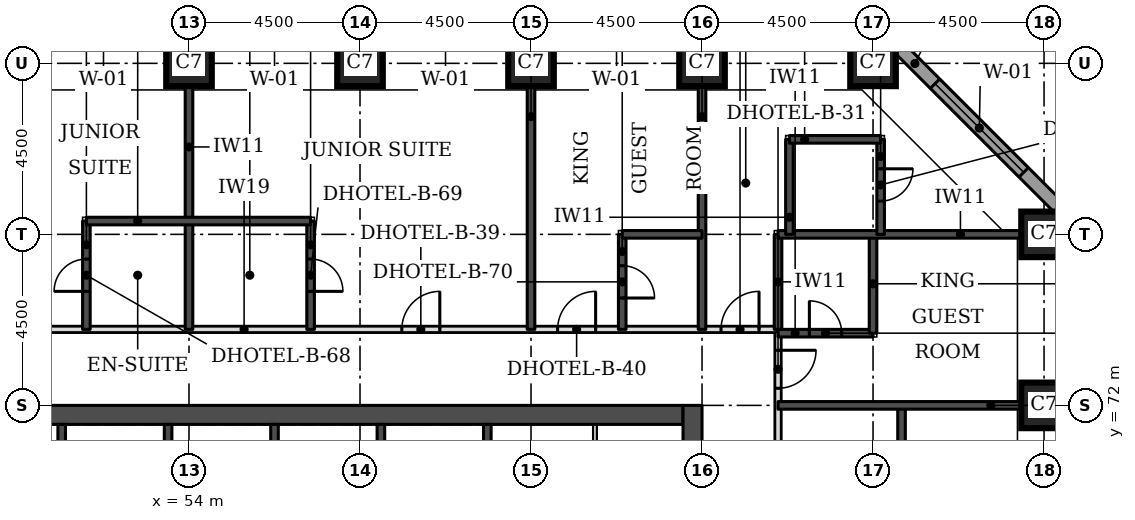
"""IFC4 building model, lengths in metres.
Left out: names, types, materials, properties, quantities, classifications, styles, units other than length and angle.
Written with IfcOpenShell. Run it as: python <this file> out.ifc"""

import sys

from ifc_helpers import new_model, si_unit, direction, frame, frame_2d, origin, origin_2d, place, context, subcontext, project, spatial, rectangle, extrude, element, fill, save


model = new_model("IFC4")
c1 = context("Model", 3, precision=1e-05, world=origin(), true_north=direction((0.0, 1.0)))
c2 = subcontext(c1, "Body", "Model", "MODEL_VIEW")
j1 = project(units=[si_unit("LENGTHUNIT", "METRE"), si_unit("PLANEANGLEUNIT", "RADIAN")], contexts=[c1])
p1 = place(None, origin())
s1 = spatial("IfcSite", under=j1, at=p1, CompositionType="ELEMENT")
p2 = place(p1, origin())
s2 = spatial("IfcBuilding", under=s1, at=p2, CompositionType="ELEMENT")
p3 = place(p2, frame((0.0, 0.0, 29.7)))
s3 = spatial("IfcBuildingStorey", under=s2, at=p3, CompositionType="ELEMENT", Elevation=29.7)
for number, where, z_axis, x_axis in (
    (1, (76.5, 72.0, 0.0), (0.0, 0.0, 1.0), (1.0, 0.0, 0.0)),
    (2, (76.5, 76.5, 0.0), (0.0, 0.0, 1.0), (1.0, 0.0, 0.0)),
    (3, (54.0, 81.0, 0.0), (0.0, 0.0, 1.0), (1.0, 0.0, 0.0)),
    (4, (58.5, 81.0, 0.0), (0.0, 0.0, 1.0), (1.0, 0.0, 0.0)),
    (5, (63.0, 81.0, 0.0), (0.0, 0.0, 1.0), (1.0, 0.0, 0.0)),
    (6, (67.5, 81.0, 0.0), (0.0, 0.0, 1.0), (1.0, 0.0, 0.0)),
    (7, (72.0, 81.0, 0.0), (0.0, 0.0, 1.0), (1.0, 0.0, 0.0)),
):
    element("IfcColumn", number, at=place(p3, frame(where, z_axis=z_axis, x_axis=x_axis)), inside=s3, PredefinedType="COLUMN", context=c2, shape_type="SweptSolid", body=[
        extrude(rectangle(XDim=1.2, YDim=1.2, at=origin_2d()), origin(), (0.0, 0.0, 1.0), 3.3),
    ])
p4 = place(p3, frame((45.5, 71.75, 0.0), z_axis=(0.0, 0.0, 1.0), x_axis=(1.0, 0.0, 0.0)))
e8 = element("IfcWall", 8, at=p4, inside=s3, PredefinedType="SHEAR", context=c2, shape_type="SweptSolid", body=[
    extrude(rectangle(XDim=21.5, YDim=0.5, at=frame_2d((10.75, 0.0))), origin(), (0.0, 0.0, 1.0), 3.3),
])
p5 = place(p3, frame((67.25, 49.5, 0.0), z_axis=(0.0, 0.0, 1.0), x_axis=(0.0, 1.0, 0.0)))
e9 = element("IfcWall", 9, at=p5, inside=s3, PredefinedType="SHEAR", context=c2, shape_type="SweptSolid", body=[
    extrude(rectangle(XDim=22.5, YDim=0.5, at=frame_2d((11.25, 0.0))), origin(), (0.0, 0.0, 1.0), 3.3),
])
p6 = place(p5, frame((4.2, 0.0, 0.0)))
e10 = element("IfcOpeningElement", 10, at=p6, cuts=e9, PredefinedType="OPENING", context=c2, shape_type="SweptSolid", body=[
    extrude(rectangle(XDim=1.8, YDim=2.1, at=frame_2d((0.9, 1.05))), frame((0.0, 0.26, 0.0), z_axis=(0.0, -1.0, 0.0), x_axis=(1.0, 0.0, 0.0)), (0.0, 0.0, 1.0), 0.52),
])
p7 = place(p5, frame((6.9, 0.0, 0.0)))
e11 = element("IfcOpeningElement", 11, at=p7, cuts=e9, PredefinedType="OPENING", context=c2, shape_type="SweptSolid", body=[
    extrude(rectangle(XDim=1.1, YDim=2.1, at=frame_2d((0.55, 1.05))), frame((0.0, 0.26, 0.0), z_axis=(0.0, -1.0, 0.0), x_axis=(1.0, 0.0, 0.0)), (0.0, 0.0, 1.0), 0.52),
])
p8 = place(p5, frame((13.6, 0.0, 0.0)))
e12 = element("IfcOpeningElement", 12, at=p8, cuts=e9, PredefinedType="OPENING", context=c2, shape_type="SweptSolid", body=[
    extrude(rectangle(XDim=1.1, YDim=2.1, at=frame_2d((0.55, 1.05))), frame((0.0, 0.26, 0.0), z_axis=(0.0, -1.0, 0.0), x_axis=(1.0, 0.0, 0.0)), (0.0, 0.0, 1.0), 0.52),
])
p9 = place(p5, frame((16.5, 0.0, 0.0)))
e13 = element("IfcOpeningElement", 13, at=p9, cuts=e9, PredefinedType="OPENING", context=c2, shape_type="SweptSolid", body=[
    extrude(rectangle(XDim=1.8, YDim=2.1, at=frame_2d((0.9, 1.05))), frame((0.0, 0.26, 0.0), z_axis=(0.0, -1.0, 0.0), x_axis=(1.0, 0.0, 0.0)), (0.0, 0.0, 1.0), 0.52),
])
p10 = place(p3, frame((77.326, 76.77, 0.0), z_axis=(0.0, 0.0, 1.0), x_axis=(-0.707106781187, 0.707106781187, 0.0)))
e14 = element("IfcWall", 14, at=p10, inside=s3, PredefinedType="STANDARD", context=c2, shape_type="SweptSolid", body=[
    extrude(rectangle(XDim=7.151, YDim=0.35, at=frame_2d((3.576, 0.0))), origin(), (0.0, 0.0, 1.0), 3.055),
])
p11 = place(p10, frame((1.926, 0.0, 0.8)))
e15 = element("IfcOpeningElement", 15, at=p11, cuts=e14, PredefinedType="OPENING", context=c2, shape_type="SweptSolid", body=[
    extrude(rectangle(XDim=3.3, YDim=1.5, at=frame_2d((1.65, 0.75))), frame((0.0, 0.185, 0.0), z_axis=(0.0, -1.0, 0.0), x_axis=(1.0, 0.0, 0.0)), (0.0, 0.0, 1.0), 0.37),
])
p12 = place(p3, frame((69.5, 47.5, 0.0), z_axis=(0.0, 0.0, 1.0), x_axis=(0.0, 1.0, 0.0)))
e16 = element("IfcWall", 16, at=p12, inside=s3, PredefinedType="PARTITIONING", context=c2, shape_type="SweptSolid", body=[
    extrude(rectangle(XDim=26.5, YDim=0.15, at=frame_2d((13.25, 0.0))), origin(), (0.0, 0.0, 1.0), 3.08),
])
p13 = place(p12, frame((24.95, 0.0, 0.0)))
e17 = element("IfcOpeningElement", 17, at=p13, cuts=e16, PredefinedType="OPENING", context=c2, shape_type="SweptSolid", body=[
    extrude(rectangle(XDim=1.0, YDim=2.1, at=frame_2d((0.5, 1.05))), frame((0.0, 0.085, 0.0), z_axis=(0.0, -1.0, 0.0), x_axis=(1.0, 0.0, 0.0)), (0.0, 0.0, 1.0), 0.17),
])
p14 = place(p12, frame((20.7, 0.0, 0.0)))
e18 = element("IfcOpeningElement", 18, at=p14, cuts=e16, PredefinedType="OPENING", context=c2, shape_type="SweptSolid", body=[
    extrude(rectangle(XDim=1.0, YDim=2.1, at=frame_2d((0.5, 1.05))), frame((0.0, 0.085, 0.0), z_axis=(0.0, -1.0, 0.0), x_axis=(1.0, 0.0, 0.0)), (0.0, 0.0, 1.0), 0.17),
])
p15 = place(p12, frame((18.55, 0.0, 0.0)))
e19 = element("IfcOpeningElement", 19, at=p15, cuts=e16, PredefinedType="OPENING", context=c2, shape_type="SweptSolid", body=[
    extrude(rectangle(XDim=1.0, YDim=2.1, at=frame_2d((0.5, 1.05))), frame((0.0, 0.085, 0.0), z_axis=(0.0, -1.0, 0.0), x_axis=(1.0, 0.0, 0.0)), (0.0, 0.0, 1.0), 0.17),
])
p16 = place(p12, frame((11.7, 0.0, 0.0)))
e20 = element("IfcOpeningElement", 20, at=p16, cuts=e16, PredefinedType="OPENING", context=c2, shape_type="SweptSolid", body=[
    extrude(rectangle(XDim=1.0, YDim=2.1, at=frame_2d((0.5, 1.05))), frame((0.0, 0.085, 0.0), z_axis=(0.0, -1.0, 0.0), x_axis=(1.0, 0.0, 0.0)), (0.0, 0.0, 1.0), 0.17),
])
p17 = place(p12, frame((7.65, 0.0, 0.0)))
e21 = element("IfcOpeningElement", 21, at=p17, cuts=e16, PredefinedType="OPENING", context=c2, shape_type="SweptSolid", body=[
    extrude(rectangle(XDim=1.1, YDim=2.1, at=frame_2d((0.55, 1.05))), frame((0.0, 0.085, 0.0), z_axis=(0.0, -1.0, 0.0), x_axis=(1.0, 0.0, 0.0)), (0.0, 0.0, 1.0), 0.17),
])
p18 = place(p12, frame((0.447, 0.0, 0.0)))
e22 = element("IfcOpeningElement", 22, at=p18, cuts=e16, PredefinedType="OPENING", context=c2, shape_type="SweptSolid", body=[
    extrude(rectangle(XDim=1.0, YDim=2.1, at=frame_2d((0.5, 1.05))), frame((0.0, 0.085, 0.0), z_axis=(0.0, -1.0, 0.0), x_axis=(1.0, 0.0, 0.0)), (0.0, 0.0, 1.0), 0.17),
])
p19 = place(p3, frame((43.0, 74.0, 0.0), z_axis=(0.0, 0.0, 1.0), x_axis=(1.0, 0.0, 0.0)))
e23 = element("IfcWall", 23, at=p19, inside=s3, PredefinedType="PARTITIONING", context=c2, shape_type="SweptSolid", body=[
    extrude(rectangle(XDim=26.5, YDim=0.15, at=frame_2d((13.25, 0.0))), origin(), (0.0, 0.0, 1.0), 3.08),
])
p20 = place(p19, frame((4.65, 0.0, 0.0)))
e24 = element("IfcOpeningElement", 24, at=p20, cuts=e23, PredefinedType="OPENING", context=c2, shape_type="SweptSolid", body=[
    extrude(rectangle(XDim=1.0, YDim=2.1, at=frame_2d((0.5, 1.05))), frame((0.0, 0.085, 0.0), z_axis=(0.0, -1.0, 0.0), x_axis=(1.0, 0.0, 0.0)), (0.0, 0.0, 1.0), 0.17),
])
p21 = place(p19, frame((16.6, 0.0, 0.0)))
e25 = element("IfcOpeningElement", 25, at=p21, cuts=e23, PredefinedType="OPENING", context=c2, shape_type="SweptSolid", body=[
    extrude(rectangle(XDim=1.0, YDim=2.1, at=frame_2d((0.5, 1.05))), frame((0.0, 0.085, 0.0), z_axis=(0.0, -1.0, 0.0), x_axis=(1.0, 0.0, 0.0)), (0.0, 0.0, 1.0), 0.17),
])
p22 = place(p19, frame((20.7, 0.0, 0.0)))
e26 = element("IfcOpeningElement", 26, at=p22, cuts=e23, PredefinedType="OPENING", context=c2, shape_type="SweptSolid", body=[
    extrude(rectangle(XDim=1.0, YDim=2.1, at=frame_2d((0.5, 1.05))), frame((0.0, 0.085, 0.0), z_axis=(0.0, -1.0, 0.0), x_axis=(1.0, 0.0, 0.0)), (0.0, 0.0, 1.0), 0.17),
])
p23 = place(p19, frame((0.5, 0.0, 0.0)))
e27 = element("IfcOpeningElement", 27, at=p23, cuts=e23, PredefinedType="OPENING", context=c2, shape_type="SweptSolid", body=[
    extrude(rectangle(XDim=1.0, YDim=2.1, at=frame_2d((0.5, 1.05))), frame((0.0, 0.085, 0.0), z_axis=(0.0, -1.0, 0.0), x_axis=(1.0, 0.0, 0.0)), (0.0, 0.0, 1.0), 0.17),
])
p24 = place(p19, frame((25.0, 0.0, 0.0)))
e28 = element("IfcOpeningElement", 28, at=p24, cuts=e23, PredefinedType="OPENING", context=c2, shape_type="SweptSolid", body=[
    extrude(rectangle(XDim=1.0, YDim=2.1, at=frame_2d((0.5, 1.05))), frame((0.0, 0.085, 0.0), z_axis=(0.0, -1.0, 0.0), x_axis=(1.0, 0.0, 0.0)), (0.0, 0.0, 1.0), 0.17),
])
p25 = place(p3, frame((72.75, 69.9, 0.0), z_axis=(0.0, 0.0, 1.0), x_axis=(0.0, 1.0, 0.0)))
e29 = element("IfcWall", 29, at=p25, inside=s3, PredefinedType="SOLIDWALL", context=c2, shape_type="SweptSolid", body=[
    extrude(rectangle(XDim=2.1, YDim=0.2, at=frame_2d((1.05, 0.0))), origin(), (0.0, 0.0, 1.0), 3.08),
])
p26 = place(p3, frame((69.5, 72.0, 0.0), z_axis=(0.0, 0.0, 1.0), x_axis=(1.0, 0.0, 0.0)))
e30 = element("IfcWall", 30, at=p26, inside=s3, PredefinedType="SOLIDWALL", context=c2, shape_type="SweptSolid", body=[
    extrude(rectangle(XDim=6.4, YDim=0.2, at=frame_2d((3.2, 0.0))), origin(), (0.0, 0.0, 1.0), 3.08),
])
p27 = place(p3, frame((69.5, 73.9, 0.0), z_axis=(0.0, 0.0, 1.0), x_axis=(1.0, 0.0, 0.0)))
e31 = element("IfcWall", 31, at=p27, inside=s3, PredefinedType="SOLIDWALL", context=c2, shape_type="SweptSolid", body=[
    extrude(rectangle(XDim=2.5, YDim=0.2, at=frame_2d((1.25, 0.0))), origin(), (0.0, 0.0, 1.0), 3.08),
])
p28 = place(p27, frame((0.825, 0.0, 0.0)))
e32 = element("IfcOpeningElement", 32, at=p28, cuts=e31, PredefinedType="OPENING", context=c2, shape_type="SweptSolid", body=[
    extrude(rectangle(XDim=0.85, YDim=2.1, at=frame_2d((0.425, 1.05))), frame((0.0, 0.11, 0.0), z_axis=(0.0, -1.0, 0.0), x_axis=(1.0, 0.0, 0.0)), (0.0, 0.0, 1.0), 0.22),
])
p29 = place(p3, frame((72.0, 73.9, 0.0), z_axis=(0.0, 0.0, 1.0), x_axis=(0.0, 1.0, 0.0)))
e33 = element("IfcWall", 33, at=p29, inside=s3, PredefinedType="SOLIDWALL", context=c2, shape_type="SweptSolid", body=[
    extrude(rectangle(XDim=2.6, YDim=0.2, at=frame_2d((1.3, 0.0))), origin(), (0.0, 0.0, 1.0), 3.08),
])
p30 = place(p3, frame((51.3, 74.0, 0.0), z_axis=(0.0, 0.0, 1.0), x_axis=(0.0, 1.0, 0.0)))
e34 = element("IfcWall", 34, at=p30, inside=s3, PredefinedType="SOLIDWALL", context=c2, shape_type="SweptSolid", body=[
    extrude(rectangle(XDim=2.85, YDim=0.2, at=frame_2d((1.425, 0.0))), origin(), (0.0, 0.0, 1.0), 3.08),
])
p31 = place(p30, frame((1.0, 0.0, 0.0)))
e35 = element("IfcOpeningElement", 35, at=p31, cuts=e34, PredefinedType="OPENING", context=c2, shape_type="SweptSolid", body=[
    extrude(rectangle(XDim=0.85, YDim=2.1, at=frame_2d((0.425, 1.05))), frame((0.0, 0.11, 0.0), z_axis=(0.0, -1.0, 0.0), x_axis=(1.0, 0.0, 0.0)), (0.0, 0.0, 1.0), 0.22),
])
p32 = place(p3, frame((54.0, 74.0, 0.0), z_axis=(0.0, 0.0, 1.0), x_axis=(0.0, 1.0, 0.0)))
e36 = element("IfcWall", 36, at=p32, inside=s3, PredefinedType="SOLIDWALL", context=c2, shape_type="SweptSolid", body=[
    extrude(rectangle(XDim=6.4, YDim=0.2, at=frame_2d((3.2, 0.0))), origin(), (0.0, 0.0, 1.0), 3.08),
])
p33 = place(p3, frame((57.2, 74.0, 0.0), z_axis=(0.0, 0.0, 1.0), x_axis=(0.0, 1.0, 0.0)))
e37 = element("IfcWall", 37, at=p33, inside=s3, PredefinedType="SOLIDWALL", context=c2, shape_type="SweptSolid", body=[
    extrude(rectangle(XDim=2.85, YDim=0.2, at=frame_2d((1.425, 0.0))), origin(), (0.0, 0.0, 1.0), 3.08),
])
p34 = place(p33, frame((1.0, 0.0, 0.0)))
e38 = element("IfcOpeningElement", 38, at=p34, cuts=e37, PredefinedType="OPENING", context=c2, shape_type="SweptSolid", body=[
    extrude(rectangle(XDim=0.85, YDim=2.1, at=frame_2d((0.425, 1.05))), frame((0.0, 0.11, 0.0), z_axis=(0.0, -1.0, 0.0), x_axis=(1.0, 0.0, 0.0)), (0.0, 0.0, 1.0), 0.22),
])
p35 = place(p3, frame((63.0, 74.0, 0.0), z_axis=(0.0, 0.0, 1.0), x_axis=(0.0, 1.0, 0.0)))
e39 = element("IfcWall", 39, at=p35, inside=s3, PredefinedType="SOLIDWALL", context=c2, shape_type="SweptSolid", body=[
    extrude(rectangle(XDim=6.4, YDim=0.2, at=frame_2d((3.2, 0.0))), origin(), (0.0, 0.0, 1.0), 3.08),
])
p36 = place(p3, frame((65.4, 74.0, 0.0), z_axis=(0.0, 0.0, 1.0), x_axis=(0.0, 1.0, 0.0)))
e40 = element("IfcWall", 40, at=p36, inside=s3, PredefinedType="SOLIDWALL", context=c2, shape_type="SweptSolid", body=[
    extrude(rectangle(XDim=2.5, YDim=0.2, at=frame_2d((1.25, 0.0))), origin(), (0.0, 0.0, 1.0), 3.08),
])
p37 = place(p36, frame((0.825, 0.0, 0.0)))
e41 = element("IfcOpeningElement", 41, at=p37, cuts=e40, PredefinedType="OPENING", context=c2, shape_type="SweptSolid", body=[
    extrude(rectangle(XDim=0.85, YDim=2.1, at=frame_2d((0.425, 1.05))), frame((0.0, 0.11, 0.0), z_axis=(0.0, -1.0, 0.0), x_axis=(1.0, 0.0, 0.0)), (0.0, 0.0, 1.0), 0.22),
])
p38 = place(p3, frame((67.5, 74.0, 0.0), z_axis=(0.0, 0.0, 1.0), x_axis=(0.0, 1.0, 0.0)))
e42 = element("IfcWall", 42, at=p38, inside=s3, PredefinedType="SOLIDWALL", context=c2, shape_type="SweptSolid", body=[
    extrude(rectangle(XDim=6.4, YDim=0.2, at=frame_2d((3.2, 0.0))), origin(), (0.0, 0.0, 1.0), 3.08),
])
p39 = place(p3, frame((69.5, 74.0, 0.0), z_axis=(0.0, 0.0, 1.0), x_axis=(0.0, 1.0, 0.0)))
e43 = element("IfcWall", 43, at=p39, inside=s3, PredefinedType="SOLIDWALL", context=c2, shape_type="SweptSolid", body=[
    extrude(rectangle(XDim=2.5, YDim=0.2, at=frame_2d((1.25, 0.0))), origin(), (0.0, 0.0, 1.0), 3.08),
])
p40 = place(p3, frame((65.4, 76.5, 0.0), z_axis=(0.0, 0.0, 1.0), x_axis=(1.0, 0.0, 0.0)))
e44 = element("IfcWall", 44, at=p40, inside=s3, PredefinedType="SOLIDWALL", context=c2, shape_type="SweptSolid", body=[
    extrude(rectangle(XDim=2.1, YDim=0.2, at=frame_2d((1.05, 0.0))), origin(), (0.0, 0.0, 1.0), 3.08),
])
p41 = place(p3, frame((69.5, 76.5, 0.0), z_axis=(0.0, 0.0, 1.0), x_axis=(1.0, 0.0, 0.0)))
e45 = element("IfcWall", 45, at=p41, inside=s3, PredefinedType="SOLIDWALL", context=c2, shape_type="SweptSolid", body=[
    extrude(rectangle(XDim=6.4, YDim=0.2, at=frame_2d((3.2, 0.0))), origin(), (0.0, 0.0, 1.0), 3.08),
])
p42 = place(p3, frame((69.8, 76.5, 0.0), z_axis=(0.0, 0.0, 1.0), x_axis=(0.0, 1.0, 0.0)))
e46 = element("IfcWall", 46, at=p42, inside=s3, PredefinedType="SOLIDWALL", context=c2, shape_type="SweptSolid", body=[
    extrude(rectangle(XDim=2.5, YDim=0.2, at=frame_2d((1.25, 0.0))), origin(), (0.0, 0.0, 1.0), 3.08),
])
p43 = place(p3, frame((72.2, 76.5, 0.0), z_axis=(0.0, 0.0, 1.0), x_axis=(0.0, 1.0, 0.0)))
e47 = element("IfcWall", 47, at=p43, inside=s3, PredefinedType="SOLIDWALL", context=c2, shape_type="SweptSolid", body=[
    extrude(rectangle(XDim=2.5, YDim=0.2, at=frame_2d((1.25, 0.0))), origin(), (0.0, 0.0, 1.0), 3.08),
])
p44 = place(p43, frame((0.875, 0.0, 0.0)))
e48 = element("IfcOpeningElement", 48, at=p44, cuts=e47, PredefinedType="OPENING", context=c2, shape_type="SweptSolid", body=[
    extrude(rectangle(XDim=0.85, YDim=2.1, at=frame_2d((0.425, 1.05))), frame((0.0, 0.11, 0.0), z_axis=(0.0, -1.0, 0.0), x_axis=(1.0, 0.0, 0.0)), (0.0, 0.0, 1.0), 0.22),
])
p45 = place(p3, frame((51.3, 76.85, 0.0), z_axis=(0.0, 0.0, 1.0), x_axis=(1.0, 0.0, 0.0)))
e49 = element("IfcWall", 49, at=p45, inside=s3, PredefinedType="SOLIDWALL", context=c2, shape_type="SweptSolid", body=[
    extrude(rectangle(XDim=5.9, YDim=0.2, at=frame_2d((2.95, 0.0))), origin(), (0.0, 0.0, 1.0), 3.08),
])
p46 = place(p3, frame((69.8, 79.0, 0.0), z_axis=(0.0, 0.0, 1.0), x_axis=(1.0, 0.0, 0.0)))
e50 = element("IfcWall", 50, at=p46, inside=s3, PredefinedType="SOLIDWALL", context=c2, shape_type="SweptSolid", body=[
    extrude(rectangle(XDim=2.4, YDim=0.2, at=frame_2d((1.2, 0.0))), origin(), (0.0, 0.0, 1.0), 3.08),
])
for number, where, z_axis, x_axis in (
    (51, (50.65, 68.5, 0.0), (0.0, 0.0, 1.0), (0.0, 1.0, 0.0)),
    (52, (53.45, 68.5, 0.0), (0.0, 0.0, 1.0), (0.0, 1.0, 0.0)),
    (53, (56.25, 68.5, 0.0), (0.0, 0.0, 1.0), (0.0, 1.0, 0.0)),
    (54, (59.05, 68.5, 0.0), (0.0, 0.0, 1.0), (0.0, 1.0, 0.0)),
    (55, (61.85, 68.5, 0.0), (0.0, 0.0, 1.0), (0.0, 1.0, 0.0)),
):
    element("IfcWall", number, at=place(p3, frame(where, z_axis=z_axis, x_axis=x_axis)), inside=s3, PredefinedType="SOLIDWALL", context=c2, shape_type="SweptSolid", body=[
        extrude(rectangle(XDim=3.0, YDim=0.2, at=frame_2d((1.5, 0.0))), origin(), (0.0, 0.0, 1.0), 3.08),
    ])
p47 = place(p3, frame((64.683, 68.5, 0.0), z_axis=(0.0, 0.0, 1.0), x_axis=(0.0, 1.0, 0.0)))
e56 = element("IfcWall", 56, at=p47, inside=s3, PredefinedType="PARTITIONING", context=c2, shape_type="SweptSolid", body=[
    extrude(rectangle(XDim=3.0, YDim=0.1, at=frame_2d((1.5, 0.0))), origin(), (0.0, 0.0, 1.0), 3.08),
])
p48 = place(p11, origin())
e57 = element("IfcWindow", 57, at=p48, inside=s3, PartitioningType="SINGLE_PANEL", PredefinedType="WINDOW", context=c2, shape_type="SweptSolid", body=[
    extrude(rectangle(XDim=3.3, YDim=1.5, at=frame_2d((1.65, 0.75))), frame((0.0, 0.085, 0.0), z_axis=(0.0, -1.0, 0.0), x_axis=(1.0, 0.0, 0.0)), (0.0, 0.0, 1.0), 0.06),
])
fill(e15, e57)
p49 = place(p31, origin())
e58 = element("IfcDoor", 58, at=p49, inside=s3, OperationType="SINGLE_SWING_LEFT", PredefinedType="DOOR", context=c2, shape_type="SweptSolid", body=[
    extrude(rectangle(XDim=0.85, YDim=2.1, at=frame_2d((0.425, 1.05))), frame((0.0, 0.025, 0.0), z_axis=(0.0, -1.0, 0.0), x_axis=(1.0, 0.0, 0.0)), (0.0, 0.0, 1.0), 0.05),
])
fill(e35, e58)
p50 = place(p21, origin())
e59 = element("IfcDoor", 59, at=p50, inside=s3, OperationType="SINGLE_SWING_RIGHT", PredefinedType="DOOR", context=c2, shape_type="SweptSolid", body=[
    extrude(rectangle(XDim=1.0, YDim=2.1, at=frame_2d((0.5, 1.05))), frame((0.0, 0.025, 0.0), z_axis=(0.0, -1.0, 0.0), x_axis=(1.0, 0.0, 0.0)), (0.0, 0.0, 1.0), 0.05),
])
fill(e25, e59)
p51 = place(p34, frame((0.85, 0.0, 0.0), z_axis=(0.0, 0.0, 1.0), x_axis=(-1.0, 0.0, 0.0)))
e60 = element("IfcDoor", 60, at=p51, inside=s3, OperationType="SINGLE_SWING_RIGHT", PredefinedType="DOOR", context=c2, shape_type="SweptSolid", body=[
    extrude(rectangle(XDim=0.85, YDim=2.1, at=frame_2d((0.425, 1.05))), frame((0.0, 0.025, 0.0), z_axis=(0.0, -1.0, 0.0), x_axis=(1.0, 0.0, 0.0)), (0.0, 0.0, 1.0), 0.05),
])
fill(e38, e60)
p52 = place(p22, origin())
e61 = element("IfcDoor", 61, at=p52, inside=s3, OperationType="SINGLE_SWING_RIGHT", PredefinedType="DOOR", context=c2, shape_type="SweptSolid", body=[
    extrude(rectangle(XDim=1.0, YDim=2.1, at=frame_2d((0.5, 1.05))), frame((0.0, 0.025, 0.0), z_axis=(0.0, -1.0, 0.0), x_axis=(1.0, 0.0, 0.0)), (0.0, 0.0, 1.0), 0.05),
])
fill(e26, e61)
p53 = place(p37, frame((0.85, 0.0, 0.0), z_axis=(0.0, 0.0, 1.0), x_axis=(-1.0, 0.0, 0.0)))
e62 = element("IfcDoor", 62, at=p53, inside=s3, OperationType="SINGLE_SWING_RIGHT", PredefinedType="DOOR", context=c2, shape_type="SweptSolid", body=[
    extrude(rectangle(XDim=0.85, YDim=2.1, at=frame_2d((0.425, 1.05))), frame((0.0, 0.025, 0.0), z_axis=(0.0, -1.0, 0.0), x_axis=(1.0, 0.0, 0.0)), (0.0, 0.0, 1.0), 0.05),
])
fill(e41, e62)
p54 = place(p13, frame((1.0, 0.0, 0.0), z_axis=(0.0, 0.0, 1.0), x_axis=(-1.0, 0.0, 0.0)))
e63 = element("IfcDoor", 63, at=p54, inside=s3, OperationType="SINGLE_SWING_LEFT", PredefinedType="DOOR", context=c2, shape_type="SweptSolid", body=[
    extrude(rectangle(XDim=1.0, YDim=2.1, at=frame_2d((0.5, 1.05))), frame((0.0, 0.025, 0.0), z_axis=(0.0, -1.0, 0.0), x_axis=(1.0, 0.0, 0.0)), (0.0, 0.0, 1.0), 0.05),
])
fill(e17, e63)
p55 = place(p28, origin())
e64 = element("IfcDoor", 64, at=p55, inside=s3, OperationType="SINGLE_SWING_LEFT", PredefinedType="DOOR", context=c2, shape_type="SweptSolid", body=[
    extrude(rectangle(XDim=0.85, YDim=2.1, at=frame_2d((0.425, 1.05))), frame((0.0, 0.025, 0.0), z_axis=(0.0, -1.0, 0.0), x_axis=(1.0, 0.0, 0.0)), (0.0, 0.0, 1.0), 0.05),
])
fill(e32, e64)
p56 = place(p24, origin())
e65 = element("IfcDoor", 65, at=p56, inside=s3, OperationType="SINGLE_SWING_RIGHT", PredefinedType="DOOR", context=c2, shape_type="SweptSolid", body=[
    extrude(rectangle(XDim=1.0, YDim=2.1, at=frame_2d((0.5, 1.05))), frame((0.0, 0.025, 0.0), z_axis=(0.0, -1.0, 0.0), x_axis=(1.0, 0.0, 0.0)), (0.0, 0.0, 1.0), 0.05),
])
fill(e28, e65)
p57 = place(p44, frame((0.85, 0.0, 0.0), z_axis=(0.0, 0.0, 1.0), x_axis=(-1.0, 0.0, 0.0)))
e66 = element("IfcDoor", 66, at=p57, inside=s3, OperationType="SINGLE_SWING_LEFT", PredefinedType="DOOR", context=c2, shape_type="SweptSolid", body=[
    extrude(rectangle(XDim=0.85, YDim=2.1, at=frame_2d((0.425, 1.05))), frame((0.0, 0.025, 0.0), z_axis=(0.0, -1.0, 0.0), x_axis=(1.0, 0.0, 0.0)), (0.0, 0.0, 1.0), 0.05),
])
fill(e48, e66)
save(model, sys.argv[1])
